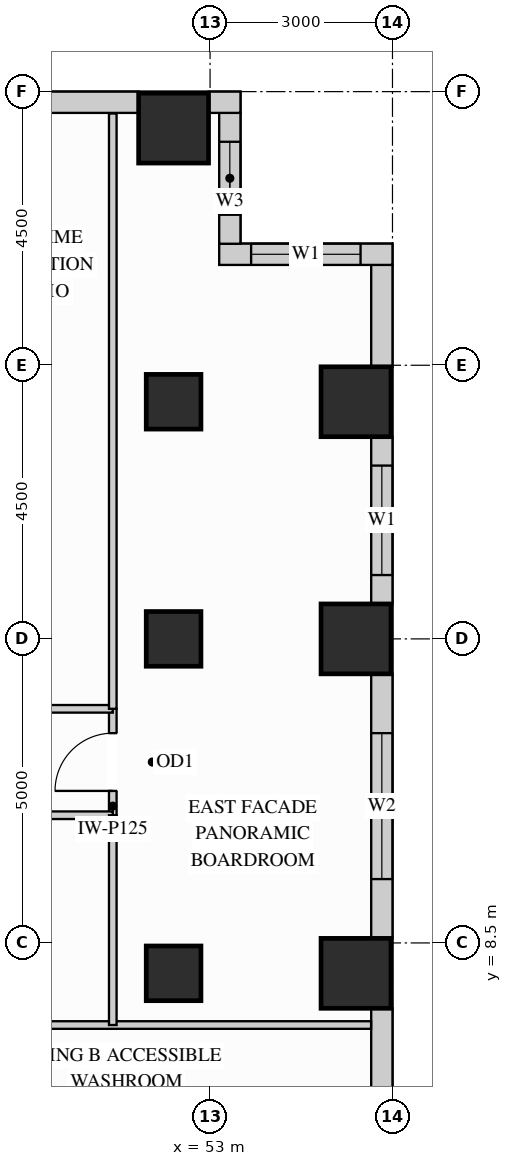
"""IFC4 building model, lengths in metres.
Left out: names, types, materials, properties, quantities, classifications, styles, units other than length and angle.
Written with IfcOpenShell. Run it as: python <this file> out.ifc"""

import sys

from ifc_helpers import new_model, si_unit, direction, frame, frame_2d, origin, origin_2d, place, context, subcontext, project, spatial, rectangle, extrude, source, transform, mapped, element, fill, save


model = new_model("IFC4")
c1 = context("Model", 3, precision=1e-05, world=origin(), true_north=direction((0.0, 1.0)))
c2 = subcontext(c1, "Body", "Model", "MODEL_VIEW")
j1 = project(units=[si_unit("LENGTHUNIT", "METRE"), si_unit("PLANEANGLEUNIT", "RADIAN")], contexts=[c1])
p1 = place(None, origin())
s1 = spatial("IfcSite", under=j1, at=p1, CompositionType="ELEMENT")
p2 = place(p1, origin())
s2 = spatial("IfcBuilding", under=s1, at=p2, CompositionType="ELEMENT")
p3 = place(p2, frame((0.0, 0.0, 77.4)))
s3 = spatial("IfcBuildingStorey", under=s2, at=p3, CompositionType="ELEMENT", Elevation=77.4)
m1 = source(origin(), c2, "Body", "SweptSolid", [
    extrude(rectangle(XDim=0.9, YDim=0.9, at=origin_2d()), origin(), (0.0, 0.0, 1.0), 3.38),
])
for number, where, z_axis, x_axis in (
    (1, (52.4, 13.5, 0.0), (0.0, 0.0, 1.0), (1.0, 0.0, 0.0)),
    (2, (52.4, 17.4, 0.0), (0.0, 0.0, 1.0), (1.0, 0.0, 0.0)),
    (3, (52.4, 8.0, 0.0), (0.0, 0.0, 1.0), (1.0, 0.0, 0.0)),
):
    element("IfcColumn", number, at=place(p3, frame(where, z_axis=z_axis, x_axis=x_axis)), inside=s3, PredefinedType="COLUMN", context=c2, shape_type="MappedRepresentation", body=[
        mapped(m1, transform((0.0, 0.0, 0.0), x_axis=(1.0, 0.0, 0.0), y_axis=(0.0, 1.0, 0.0), z_axis=(0.0, 0.0, 1.0))),
    ])
m2 = source(origin(), c2, "Body", "SweptSolid", [
    extrude(rectangle(XDim=1.15, YDim=1.15, at=origin_2d()), origin(), (0.0, 0.0, 1.0), 3.38),
])
for number, where, z_axis, x_axis in (
    (4, (52.4, 21.9, 0.0), (0.0, 0.0, 1.0), (1.0, 0.0, 0.0)),
    (5, (55.4, 13.5, 0.0), (0.0, 0.0, 1.0), (1.0, 0.0, 0.0)),
    (6, (55.4, 17.4, 0.0), (0.0, 0.0, 1.0), (1.0, 0.0, 0.0)),
    (7, (55.4, 8.0, 0.0), (0.0, 0.0, 1.0), (1.0, 0.0, 0.0)),
):
    element("IfcColumn", number, at=place(p3, frame(where, z_axis=z_axis, x_axis=x_axis)), inside=s3, PredefinedType="COLUMN", context=c2, shape_type="MappedRepresentation", body=[
        mapped(m2, transform((0.0, 0.0, 0.0), x_axis=(1.0, 0.0, 0.0), y_axis=(0.0, 1.0, 0.0), z_axis=(0.0, 0.0, 1.0))),
    ])
m3 = source(origin(), c2, "Body", "SweptSolid", [
    extrude(rectangle(XDim=3.354, YDim=0.35, at=frame_2d((1.677, 0.0))), origin(), (0.0, 0.0, 1.0), 3.365),
])
p4 = place(p3, frame((55.825, 4.073, 0.0), z_axis=(0.0, 0.0, 1.0), x_axis=(0.0, 1.0, 0.0)))
e8 = element("IfcWall", 8, at=p4, inside=s3, PredefinedType="SOLIDWALL", context=c2, shape_type="MappedRepresentation", body=[
    mapped(m3, transform((0.0, 0.0, 0.0), x_axis=(1.0, 0.0, 0.0), y_axis=(0.0, 1.0, 0.0), z_axis=(0.0, 0.0, 1.0))),
])
p5 = place(p3, frame((55.825, 8.573, 0.0), z_axis=(0.0, 0.0, 1.0), x_axis=(0.0, 1.0, 0.0)))
e9 = element("IfcWall", 9, at=p5, inside=s3, PredefinedType="SOLIDWALL", context=c2, shape_type="SweptSolid", body=[
    extrude(rectangle(XDim=4.354, YDim=0.35, at=frame_2d((2.177, 0.0))), origin(), (0.0, 0.0, 1.0), 3.365),
])
p6 = place(p5, frame((0.977, 0.0, 0.78)))
e10 = element("IfcOpeningElement", 10, at=p6, cuts=e9, PredefinedType="OPENING", context=c2, shape_type="SweptSolid", body=[
    extrude(rectangle(XDim=2.4, YDim=2.1, at=frame_2d((1.2, 1.05))), frame((0.0, 0.185, 0.0), z_axis=(0.0, -1.0, 0.0), x_axis=(1.0, 0.0, 0.0)), (0.0, 0.0, 1.0), 0.37),
])
p7 = place(p3, frame((55.825, 14.073, 0.0), z_axis=(0.0, 0.0, 1.0), x_axis=(0.0, 1.0, 0.0)))
e11 = element("IfcWall", 11, at=p7, inside=s3, PredefinedType="SOLIDWALL", context=c2, shape_type="SweptSolid", body=[
    extrude(rectangle(XDim=2.754, YDim=0.35, at=frame_2d((1.377, 0.0))), origin(), (0.0, 0.0, 1.0), 3.365),
])
p8 = place(p7, frame((0.477, 0.0, 0.78)))
e12 = element("IfcOpeningElement", 12, at=p8, cuts=e11, PredefinedType="OPENING", context=c2, shape_type="SweptSolid", body=[
    extrude(rectangle(XDim=1.8, YDim=2.1, at=frame_2d((0.9, 1.05))), frame((0.0, 0.185, 0.0), z_axis=(0.0, -1.0, 0.0), x_axis=(1.0, 0.0, 0.0)), (0.0, 0.0, 1.0), 0.37),
])
m4 = source(origin(), c2, "Body", "SweptSolid", [
    extrude(rectangle(XDim=1.679, YDim=0.35, at=frame_2d((0.84, 0.0))), origin(), (0.0, 0.0, 1.0), 3.365),
])
p9 = place(p3, frame((55.825, 17.973, 0.0), z_axis=(0.0, 0.0, 1.0), x_axis=(0.0, 1.0, 0.0)))
e13 = element("IfcWall", 13, at=p9, inside=s3, PredefinedType="SOLIDWALL", context=c2, shape_type="MappedRepresentation", body=[
    mapped(m4, transform((0.0, 0.0, 0.0), x_axis=(1.0, 0.0, 0.0), y_axis=(0.0, 1.0, 0.0), z_axis=(0.0, 0.0, 1.0))),
])
p10 = place(p3, frame((56.0, 19.825, 0.0), z_axis=(0.0, 0.0, 1.0), x_axis=(-1.0, 0.0, 0.0)))
e14 = element("IfcWall", 14, at=p10, inside=s3, PredefinedType="SOLIDWALL", context=c2, shape_type="SweptSolid", body=[
    extrude(rectangle(XDim=2.85, YDim=0.35, at=frame_2d((1.425, 0.0))), origin(), (0.0, 0.0, 1.0), 3.365),
])
p11 = place(p10, frame((0.525, 0.0, 0.78)))
e15 = element("IfcOpeningElement", 15, at=p11, cuts=e14, PredefinedType="OPENING", context=c2, shape_type="SweptSolid", body=[
    extrude(rectangle(XDim=1.8, YDim=2.1, at=frame_2d((0.9, 1.05))), frame((0.0, 0.185, 0.0), z_axis=(0.0, -1.0, 0.0), x_axis=(1.0, 0.0, 0.0)), (0.0, 0.0, 1.0), 0.37),
])
p12 = place(p3, frame((53.325, 19.998, 0.0), z_axis=(0.0, 0.0, 1.0), x_axis=(0.0, 1.0, 0.0)))
e16 = element("IfcWall", 16, at=p12, inside=s3, PredefinedType="SOLIDWALL", context=c2, shape_type="SweptSolid", body=[
    extrude(rectangle(XDim=2.154, YDim=0.35, at=frame_2d((1.077, 0.0))), origin(), (0.0, 0.0, 1.0), 3.365),
])
p13 = place(p12, frame((0.477, 0.0, 0.78)))
e17 = element("IfcOpeningElement", 17, at=p13, cuts=e16, PredefinedType="OPENING", context=c2, shape_type="SweptSolid", body=[
    extrude(rectangle(XDim=1.2, YDim=2.1, at=frame_2d((0.6, 1.05))), frame((0.0, 0.185, 0.0), z_axis=(0.0, -1.0, 0.0), x_axis=(1.0, 0.0, 0.0)), (0.0, 0.0, 1.0), 0.37),
])
m5 = source(origin(), c2, "Body", "SweptSolid", [
    extrude(rectangle(XDim=0.527, YDim=0.35, at=frame_2d((0.264, 0.0))), origin(), (0.0, 0.0, 1.0), 3.365),
])
p14 = place(p3, frame((53.5, 22.325, 0.0), z_axis=(0.0, 0.0, 1.0), x_axis=(-1.0, 0.0, 0.0)))
e18 = element("IfcWall", 18, at=p14, inside=s3, PredefinedType="SOLIDWALL", context=c2, shape_type="MappedRepresentation", body=[
    mapped(m5, transform((0.0, 0.0, 0.0), x_axis=(1.0, 0.0, 0.0), y_axis=(0.0, 1.0, 0.0), z_axis=(0.0, 0.0, 1.0))),
])
m6 = source(origin(), c2, "Body", "SweptSolid", [
    extrude(rectangle(XDim=1.854, YDim=0.35, at=frame_2d((0.927, 0.0))), origin(), (0.0, 0.0, 1.0), 3.365),
])
p15 = place(p3, frame((51.827, 22.325, 0.0), z_axis=(0.0, 0.0, 1.0), x_axis=(-1.0, 0.0, 0.0)))
e19 = element("IfcWall", 19, at=p15, inside=s3, PredefinedType="SOLIDWALL", context=c2, shape_type="MappedRepresentation", body=[
    mapped(m6, transform((0.0, 0.0, 0.0), x_axis=(1.0, 0.0, 0.0), y_axis=(0.0, 1.0, 0.0), z_axis=(0.0, 0.0, 1.0))),
])
p16 = place(p3, frame((51.4, 10.6, 0.0), z_axis=(0.0, 0.0, 1.0), x_axis=(0.0, 1.0, 0.0)))
e20 = element("IfcWall", 20, at=p16, inside=s3, PredefinedType="PARTITIONING", context=c2, shape_type="SweptSolid", body=[
    extrude(rectangle(XDim=1.75, YDim=0.125, at=frame_2d((0.875, 0.0))), origin(), (0.0, 0.0, 1.0), 3.365),
])
p17 = place(p16, frame((0.4, 0.0, 0.0)))
e21 = element("IfcOpeningElement", 21, at=p17, cuts=e20, PredefinedType="OPENING", context=c2, shape_type="SweptSolid", body=[
    extrude(rectangle(XDim=0.95, YDim=2.15, at=frame_2d((0.475, 1.075))), frame((0.0, 0.073, 0.0), z_axis=(0.0, -1.0, 0.0), x_axis=(1.0, 0.0, 0.0)), (0.0, 0.0, 1.0), 0.145),
])
m7 = source(origin(), c2, "Body", "SweptSolid", [
    extrude(rectangle(XDim=8.048, YDim=0.125, at=frame_2d((4.024, 0.0))), origin(), (0.0, 0.0, 1.0), 3.365),
])
p18 = place(p3, frame((47.6, 7.15, 0.0), z_axis=(0.0, 0.0, 1.0), x_axis=(1.0, 0.0, 0.0)))
e22 = element("IfcWall", 22, at=p18, inside=s3, PredefinedType="PARTITIONING", context=c2, shape_type="MappedRepresentation", body=[
    mapped(m7, transform((0.0, 0.0, 0.0), x_axis=(1.0, 0.0, 0.0), y_axis=(0.0, 1.0, 0.0), z_axis=(0.0, 0.0, 1.0))),
])
m8 = source(origin(), c2, "Body", "SweptSolid", [
    extrude(rectangle(XDim=3.8, YDim=0.125, at=frame_2d((1.9, 0.0))), origin(), (0.0, 0.0, 1.0), 3.365),
])
p19 = place(p3, frame((47.6, 12.35, 0.0), z_axis=(0.0, 0.0, 1.0), x_axis=(1.0, 0.0, 0.0)))
e23 = element("IfcWall", 23, at=p19, inside=s3, PredefinedType="PARTITIONING", context=c2, shape_type="MappedRepresentation", body=[
    mapped(m8, transform((0.0, 0.0, 0.0), x_axis=(1.0, 0.0, 0.0), y_axis=(0.0, 1.0, 0.0), z_axis=(0.0, 0.0, 1.0))),
])
p20 = place(p3, frame((47.6, 10.6, 0.0), z_axis=(0.0, 0.0, 1.0), x_axis=(1.0, 0.0, 0.0)))
e24 = element("IfcWall", 24, at=p20, inside=s3, PredefinedType="PARTITIONING", context=c2, shape_type="SweptSolid", body=[
    extrude(rectangle(XDim=3.8, YDim=0.125, at=frame_2d((1.9, 0.0))), origin(), (0.0, 0.0, 1.0), 2.677),
])
p21 = place(p20, frame((1.425, 0.0, 0.0)))
e25 = element("IfcOpeningElement", 25, at=p21, cuts=e24, PredefinedType="OPENING", context=c2, shape_type="SweptSolid", body=[
    extrude(rectangle(XDim=0.95, YDim=2.15, at=frame_2d((0.475, 1.075))), frame((0.0, 0.073, 0.0), z_axis=(0.0, -1.0, 0.0), x_axis=(1.0, 0.0, 0.0)), (0.0, 0.0, 1.0), 0.145),
])
m9 = source(origin(), c2, "Body", "SweptSolid", [
    extrude(rectangle(XDim=3.45, YDim=0.125, at=frame_2d((1.725, 0.0))), origin(), (0.0, 0.0, 1.0), 3.365),
])
p22 = place(p3, frame((51.4, 7.15, 0.0), z_axis=(0.0, 0.0, 1.0), x_axis=(0.0, 1.0, 0.0)))
e26 = element("IfcWall", 26, at=p22, inside=s3, PredefinedType="PARTITIONING", context=c2, shape_type="MappedRepresentation", body=[
    mapped(m9, transform((0.0, 0.0, 0.0), x_axis=(1.0, 0.0, 0.0), y_axis=(0.0, 1.0, 0.0), z_axis=(0.0, 0.0, 1.0))),
])
m10 = source(origin(), c2, "Body", "SweptSolid", [
    extrude(rectangle(XDim=9.79, YDim=0.125, at=frame_2d((4.895, 0.0))), origin(), (0.0, 0.0, 1.0), 3.365),
])
p23 = place(p3, frame((51.4, 12.35, 0.0), z_axis=(0.0, 0.0, 1.0), x_axis=(0.0, 1.0, 0.0)))
e27 = element("IfcWall", 27, at=p23, inside=s3, PredefinedType="PARTITIONING", context=c2, shape_type="MappedRepresentation", body=[
    mapped(m10, transform((0.0, 0.0, 0.0), x_axis=(1.0, 0.0, 0.0), y_axis=(0.0, 1.0, 0.0), z_axis=(0.0, 0.0, 1.0))),
])
m11 = source(origin(), c2, "Body", "SweptSolid", [
    extrude(rectangle(XDim=0.95, YDim=2.15, at=frame_2d((0.475, 1.075))), frame((0.0, 0.025, 0.0), z_axis=(0.0, -1.0, 0.0), x_axis=(1.0, 0.0, 0.0)), (0.0, 0.0, 1.0), 0.05),
])
p24 = place(p17, origin())
e28 = element("IfcDoor", 28, at=p24, inside=s3, OperationType="SINGLE_SWING_LEFT", PredefinedType="DOOR", context=c2, shape_type="MappedRepresentation", body=[
    mapped(m11, transform((0.0, 0.0, 0.0), x_axis=(1.0, 0.0, 0.0), y_axis=(0.0, 1.0, 0.0), z_axis=(0.0, 0.0, 1.0))),
])
fill(e21, e28)
m12 = source(origin(), c2, "Body", "SweptSolid", [
    extrude(rectangle(XDim=1.8, YDim=2.1, at=frame_2d((0.9, 1.05))), frame((0.0, 0.03, 0.0), z_axis=(0.0, -1.0, 0.0), x_axis=(1.0, 0.0, 0.0)), (0.0, 0.0, 1.0), 0.06),
])
p25 = place(p8, origin())
e29 = element("IfcWindow", 29, at=p25, inside=s3, PartitioningType="SINGLE_PANEL", PredefinedType="WINDOW", context=c2, shape_type="MappedRepresentation", body=[
    mapped(m12, transform((0.0, 0.0, 0.0), x_axis=(1.0, 0.0, 0.0), y_axis=(0.0, 1.0, 0.0), z_axis=(0.0, 0.0, 1.0))),
])
fill(e12, e29)
p26 = place(p11, origin())
e30 = element("IfcWindow", 30, at=p26, inside=s3, PartitioningType="SINGLE_PANEL", PredefinedType="WINDOW", context=c2, shape_type="MappedRepresentation", body=[
    mapped(m12, transform((0.0, 0.0, 0.0), x_axis=(1.0, 0.0, 0.0), y_axis=(0.0, 1.0, 0.0), z_axis=(0.0, 0.0, 1.0))),
])
fill(e15, e30)
m13 = source(origin(), c2, "Body", "SweptSolid", [
    extrude(rectangle(XDim=2.4, YDim=2.1, at=frame_2d((1.2, 1.05))), frame((0.0, 0.03, 0.0), z_axis=(0.0, -1.0, 0.0), x_axis=(1.0, 0.0, 0.0)), (0.0, 0.0, 1.0), 0.06),
])
p27 = place(p6, origin())
e31 = element("IfcWindow", 31, at=p27, inside=s3, PartitioningType="SINGLE_PANEL", PredefinedType="WINDOW", context=c2, shape_type="MappedRepresentation", body=[
    mapped(m13, transform((0.0, 0.0, 0.0), x_axis=(1.0, 0.0, 0.0), y_axis=(0.0, 1.0, 0.0), z_axis=(0.0, 0.0, 1.0))),
])
fill(e10, e31)
m14 = source(origin(), c2, "Body", "SweptSolid", [
    extrude(rectangle(XDim=1.2, YDim=2.1, at=frame_2d((0.6, 1.05))), frame((0.0, 0.03, 0.0), z_axis=(0.0, -1.0, 0.0), x_axis=(1.0, 0.0, 0.0)), (0.0, 0.0, 1.0), 0.06),
])
p28 = place(p13, origin())
e32 = element("IfcWindow", 32, at=p28, inside=s3, PartitioningType="SINGLE_PANEL", PredefinedType="WINDOW", context=c2, shape_type="MappedRepresentation", body=[
    mapped(m14, transform((0.0, 0.0, 0.0), x_axis=(1.0, 0.0, 0.0), y_axis=(0.0, 1.0, 0.0), z_axis=(0.0, 0.0, 1.0))),
])
fill(e17, e32)
save(model, sys.argv[1])
